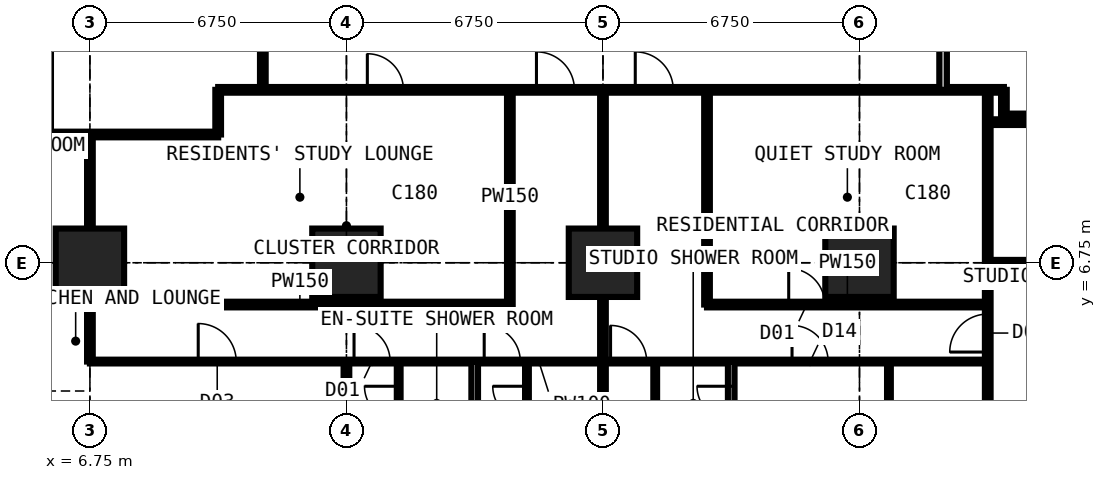
"""IFC4 building model, lengths in metres.
Left out: names, types, materials, properties, quantities, classifications, styles, units other than length and angle.
Written with IfcOpenShell. Run it as: python <this file> out.ifc"""

import sys

from ifc_helpers import new_model, si_unit, direction, frame, frame_2d, origin, origin_2d, place, context, subcontext, project, spatial, rectangle, extrude, element, fill, save


model = new_model("IFC4")
c1 = context("Model", 3, precision=1e-05, world=origin(), true_north=direction((0.0, 1.0)))
c2 = subcontext(c1, "Body", "Model", "MODEL_VIEW")
j1 = project(units=[si_unit("LENGTHUNIT", "METRE"), si_unit("PLANEANGLEUNIT", "RADIAN")], contexts=[c1])
p1 = place(None, origin())
s1 = spatial("IfcSite", under=j1, at=p1, CompositionType="ELEMENT")
p2 = place(p1, origin())
s2 = spatial("IfcBuilding", under=s1, at=p2, CompositionType="ELEMENT")
p3 = place(p2, frame((0.0, 0.0, 101.7)))
s3 = spatial("IfcBuildingStorey", under=s2, at=p3, CompositionType="ELEMENT", Elevation=101.7)
for number, where, z_axis, x_axis in (
    (1, (6.75, 6.75, 0.0), (0.0, 0.0, 1.0), (1.0, 0.0, 0.0)),
    (2, (13.5, 6.75, 0.0), (0.0, 0.0, 1.0), (1.0, 0.0, 0.0)),
    (3, (20.25, 6.75, 0.0), (0.0, 0.0, 1.0), (1.0, 0.0, 0.0)),
    (4, (27.0, 6.75, 0.0), (0.0, 0.0, 1.0), (1.0, 0.0, 0.0)),
):
    element("IfcColumn", number, at=place(p3, frame(where, z_axis=z_axis, x_axis=x_axis)), inside=s3, PredefinedType="COLUMN", context=c2, shape_type="SweptSolid", body=[
        extrude(rectangle(XDim=1.8, YDim=1.8, at=origin_2d()), origin(), (0.0, 0.0, 1.0), 3.6),
    ])
p4 = place(p3, frame((-0.734, 10.125, 0.0), z_axis=(0.0, 0.0, 1.0), x_axis=(1.0, 0.0, 0.0)))
e5 = element("IfcWall", 5, at=p4, inside=s3, PredefinedType="PARTITIONING", context=c2, shape_type="SweptSolid", body=[
    extrude(rectangle(XDim=10.859, YDim=0.15, at=frame_2d((5.429, 0.0))), origin(), (0.0, 0.0, 1.0), 3.375),
])
p5 = place(p3, frame((6.75, 4.15, 0.0), z_axis=(0.0, 0.0, 1.0), x_axis=(0.0, 1.0, 0.0)))
e6 = element("IfcWall", 6, at=p5, inside=s3, PredefinedType="PARTITIONING", context=c2, shape_type="SweptSolid", body=[
    extrude(rectangle(XDim=5.975, YDim=0.15, at=frame_2d((2.988, 0.0))), origin(), (0.0, 0.0, 1.0), 2.877),
])
p6 = place(p3, frame((6.75, 4.15, 0.0), z_axis=(0.0, 0.0, 1.0), x_axis=(1.0, 0.0, 0.0)))
e7 = element("IfcWall", 7, at=p6, inside=s3, PredefinedType="PARTITIONING", context=c2, shape_type="SweptSolid", body=[
    extrude(rectangle(XDim=23.625, YDim=0.1, at=frame_2d((11.812, 0.0))), origin(), (0.0, 0.0, 1.0), 3.375),
])
p7 = place(p6, frame((2.85, 0.0, 0.0)))
e8 = element("IfcOpeningElement", 8, at=p7, cuts=e7, PredefinedType="OPENING", context=c2, shape_type="SweptSolid", body=[
    extrude(rectangle(XDim=1.0, YDim=2.2, at=frame_2d((0.5, 1.1))), frame((0.0, 0.06, 0.0), z_axis=(0.0, -1.0, 0.0), x_axis=(1.0, 0.0, 0.0)), (0.0, 0.0, 1.0), 0.12),
])
p8 = place(p6, frame((6.95, 0.0, 0.0)))
e9 = element("IfcOpeningElement", 9, at=p8, cuts=e7, PredefinedType="OPENING", context=c2, shape_type="SweptSolid", body=[
    extrude(rectangle(XDim=0.95, YDim=2.2, at=frame_2d((0.475, 1.1))), frame((0.0, 0.06, 0.0), z_axis=(0.0, -1.0, 0.0), x_axis=(1.0, 0.0, 0.0)), (0.0, 0.0, 1.0), 0.12),
])
p9 = place(p6, frame((10.375, 0.0, 0.0)))
e10 = element("IfcOpeningElement", 10, at=p9, cuts=e7, PredefinedType="OPENING", context=c2, shape_type="SweptSolid", body=[
    extrude(rectangle(XDim=0.95, YDim=2.2, at=frame_2d((0.475, 1.1))), frame((0.0, 0.06, 0.0), z_axis=(0.0, -1.0, 0.0), x_axis=(1.0, 0.0, 0.0)), (0.0, 0.0, 1.0), 0.12),
])
p10 = place(p6, frame((18.475, 0.0, 0.0)))
e11 = element("IfcOpeningElement", 11, at=p10, cuts=e7, PredefinedType="OPENING", context=c2, shape_type="SweptSolid", body=[
    extrude(rectangle(XDim=0.95, YDim=2.2, at=frame_2d((0.475, 1.1))), frame((0.0, 0.06, 0.0), z_axis=(0.0, -1.0, 0.0), x_axis=(1.0, 0.0, 0.0)), (0.0, 0.0, 1.0), 0.12),
])
p11 = place(p6, frame((13.7, 0.0, 0.0)))
e12 = element("IfcOpeningElement", 12, at=p11, cuts=e7, PredefinedType="OPENING", context=c2, shape_type="SweptSolid", body=[
    extrude(rectangle(XDim=0.95, YDim=2.2, at=frame_2d((0.475, 1.1))), frame((0.0, 0.06, 0.0), z_axis=(0.0, -1.0, 0.0), x_axis=(1.0, 0.0, 0.0)), (0.0, 0.0, 1.0), 0.12),
])
p12 = place(p3, frame((6.75, 5.65, 0.0), z_axis=(0.0, 0.0, 1.0), x_axis=(1.0, 0.0, 0.0)))
e13 = element("IfcWall", 13, at=p12, inside=s3, PredefinedType="PARTITIONING", context=c2, shape_type="SweptSolid", body=[
    extrude(rectangle(XDim=11.05, YDim=0.15, at=frame_2d((5.525, 0.0))), origin(), (0.0, 0.0, 1.0), 3.375),
])
p13 = place(p3, frame((10.125, 10.125, 0.0), z_axis=(0.0, 0.0, 1.0), x_axis=(0.0, 1.0, 0.0)))
e14 = element("IfcWall", 14, at=p13, inside=s3, PredefinedType="PARTITIONING", context=c2, shape_type="SweptSolid", body=[
    extrude(rectangle(XDim=1.175, YDim=0.15, at=frame_2d((0.587, 0.0))), origin(), (0.0, 0.0, 1.0), 3.375),
])
p14 = place(p3, frame((10.125, 11.3, 0.0), z_axis=(0.0, 0.0, 1.0), x_axis=(1.0, 0.0, 0.0)))
e15 = element("IfcWall", 15, at=p14, inside=s3, PredefinedType="PARTITIONING", context=c2, shape_type="SweptSolid", body=[
    extrude(rectangle(XDim=20.675, YDim=0.15, at=frame_2d((10.337, 0.0))), origin(), (0.0, 0.0, 1.0), 3.375),
])
p15 = place(p14, frame((8.375, 0.0, 0.0)))
e16 = element("IfcOpeningElement", 16, at=p15, cuts=e15, PredefinedType="OPENING", context=c2, shape_type="SweptSolid", body=[
    extrude(rectangle(XDim=1.0, YDim=2.2, at=frame_2d((0.5, 1.1))), frame((0.0, 0.085, 0.0), z_axis=(0.0, -1.0, 0.0), x_axis=(1.0, 0.0, 0.0)), (0.0, 0.0, 1.0), 0.17),
])
p16 = place(p14, frame((10.975, 0.0, 0.0)))
e17 = element("IfcOpeningElement", 17, at=p16, cuts=e15, PredefinedType="OPENING", context=c2, shape_type="SweptSolid", body=[
    extrude(rectangle(XDim=1.0, YDim=2.2, at=frame_2d((0.5, 1.1))), frame((0.0, 0.085, 0.0), z_axis=(0.0, -1.0, 0.0), x_axis=(1.0, 0.0, 0.0)), (0.0, 0.0, 1.0), 0.17),
])
p17 = place(p14, frame((3.925, 0.0, 0.0)))
e18 = element("IfcOpeningElement", 18, at=p17, cuts=e15, PredefinedType="OPENING", context=c2, shape_type="SweptSolid", body=[
    extrude(rectangle(XDim=0.95, YDim=2.2, at=frame_2d((0.475, 1.1))), frame((0.0, 0.085, 0.0), z_axis=(0.0, -1.0, 0.0), x_axis=(1.0, 0.0, 0.0)), (0.0, 0.0, 1.0), 0.17),
])
p18 = place(p3, frame((11.3, 11.3, 0.0), z_axis=(0.0, 0.0, 1.0), x_axis=(0.0, 1.0, 0.0)))
e19 = element("IfcWall", 19, at=p18, inside=s3, PredefinedType="PARTITIONING", context=c2, shape_type="SweptSolid", body=[
    extrude(rectangle(XDim=19.3, YDim=0.15, at=frame_2d((9.65, 0.0))), origin(), (0.0, 0.0, 1.0), 3.375),
])
p19 = place(p18, frame((13.525, 0.0, 0.0)))
e20 = element("IfcOpeningElement", 20, at=p19, cuts=e19, PredefinedType="OPENING", context=c2, shape_type="SweptSolid", body=[
    extrude(rectangle(XDim=1.0, YDim=2.2, at=frame_2d((0.5, 1.1))), frame((0.0, 0.085, 0.0), z_axis=(0.0, -1.0, 0.0), x_axis=(1.0, 0.0, 0.0)), (0.0, 0.0, 1.0), 0.17),
])
p20 = place(p18, frame((10.438, 0.0, 0.0)))
e21 = element("IfcOpeningElement", 21, at=p20, cuts=e19, PredefinedType="OPENING", context=c2, shape_type="SweptSolid", body=[
    extrude(rectangle(XDim=1.0, YDim=2.2, at=frame_2d((0.5, 1.1))), frame((0.0, 0.085, 0.0), z_axis=(0.0, -1.0, 0.0), x_axis=(1.0, 0.0, 0.0)), (0.0, 0.0, 1.0), 0.17),
])
p21 = place(p3, frame((13.5, -0.734, 0.0), z_axis=(0.0, 0.0, 1.0), x_axis=(0.0, 1.0, 0.0)))
e22 = element("IfcWall", 22, at=p21, inside=s3, PredefinedType="PARTITIONING", context=c2, shape_type="SweptSolid", body=[
    extrude(rectangle(XDim=4.884, YDim=0.15, at=frame_2d((2.442, 0.0))), origin(), (0.0, 0.0, 1.0), 2.877),
])
p22 = place(p3, frame((14.875, 1.95, 0.0), z_axis=(0.0, 0.0, 1.0), x_axis=(0.0, 1.0, 0.0)))
e23 = element("IfcWall", 23, at=p22, inside=s3, PredefinedType="PARTITIONING", context=c2, shape_type="SweptSolid", body=[
    extrude(rectangle(XDim=2.2, YDim=0.1, at=frame_2d((1.1, 0.0))), origin(), (0.0, 0.0, 1.0), 3.375),
])
p23 = place(p22, frame((0.65, 0.0, 0.0)))
e24 = element("IfcOpeningElement", 24, at=p23, cuts=e23, PredefinedType="OPENING", context=c2, shape_type="SweptSolid", body=[
    extrude(rectangle(XDim=0.9, YDim=2.2, at=frame_2d((0.45, 1.1))), frame((0.0, 0.06, 0.0), z_axis=(0.0, -1.0, 0.0), x_axis=(1.0, 0.0, 0.0)), (0.0, 0.0, 1.0), 0.12),
])
p24 = place(p3, frame((16.875, -0.734, 0.0), z_axis=(0.0, 0.0, 1.0), x_axis=(0.0, 1.0, 0.0)))
e25 = element("IfcWall", 25, at=p24, inside=s3, PredefinedType="PARTITIONING", context=c2, shape_type="SweptSolid", body=[
    extrude(rectangle(XDim=4.884, YDim=0.175, at=frame_2d((2.442, 0.0))), origin(), (0.0, 0.0, 1.0), 3.375),
])
p25 = place(p3, frame((17.8, 5.65, 0.0), z_axis=(0.0, 0.0, 1.0), x_axis=(0.0, 1.0, 0.0)))
e26 = element("IfcWall", 26, at=p25, inside=s3, PredefinedType="PARTITIONING", context=c2, shape_type="SweptSolid", body=[
    extrude(rectangle(XDim=5.65, YDim=0.15, at=frame_2d((2.825, 0.0))), origin(), (0.0, 0.0, 1.0), 3.375),
])
p26 = place(p3, frame((18.25, 1.95, 0.0), z_axis=(0.0, 0.0, 1.0), x_axis=(0.0, 1.0, 0.0)))
e27 = element("IfcWall", 27, at=p26, inside=s3, PredefinedType="PARTITIONING", context=c2, shape_type="SweptSolid", body=[
    extrude(rectangle(XDim=2.2, YDim=0.1, at=frame_2d((1.1, 0.0))), origin(), (0.0, 0.0, 1.0), 3.375),
])
p27 = place(p26, frame((0.65, 0.0, 0.0)))
e28 = element("IfcOpeningElement", 28, at=p27, cuts=e27, PredefinedType="OPENING", context=c2, shape_type="SweptSolid", body=[
    extrude(rectangle(XDim=0.9, YDim=2.2, at=frame_2d((0.45, 1.1))), frame((0.0, 0.06, 0.0), z_axis=(0.0, -1.0, 0.0), x_axis=(1.0, 0.0, 0.0)), (0.0, 0.0, 1.0), 0.12),
])
p28 = place(p3, frame((20.25, -0.734, 0.0), z_axis=(0.0, 0.0, 1.0), x_axis=(0.0, 1.0, 0.0)))
e29 = element("IfcWall", 29, at=p28, inside=s3, PredefinedType="PARTITIONING", context=c2, shape_type="SweptSolid", body=[
    extrude(rectangle(XDim=12.034, YDim=0.15, at=frame_2d((6.017, 0.0))), origin(), (0.0, 0.0, 1.0), 2.61),
])
p29 = place(p3, frame((21.625, 1.95, 0.0), z_axis=(0.0, 0.0, 1.0), x_axis=(0.0, 1.0, 0.0)))
e30 = element("IfcWall", 30, at=p29, inside=s3, PredefinedType="PARTITIONING", context=c2, shape_type="SweptSolid", body=[
    extrude(rectangle(XDim=2.2, YDim=0.1, at=frame_2d((1.1, 0.0))), origin(), (0.0, 0.0, 1.0), 3.375),
])
p30 = place(p3, frame((22.988, 5.65, 0.0), z_axis=(0.0, 0.0, 1.0), x_axis=(1.0, 0.0, 0.0)))
e31 = element("IfcWall", 31, at=p30, inside=s3, PredefinedType="PARTITIONING", context=c2, shape_type="SweptSolid", body=[
    extrude(rectangle(XDim=7.387, YDim=0.15, at=frame_2d((3.694, 0.0))), origin(), (0.0, 0.0, 1.0), 3.375),
])
p31 = place(p30, frame((2.15, 0.0, 0.0)))
e32 = element("IfcOpeningElement", 32, at=p31, cuts=e31, PredefinedType="OPENING", context=c2, shape_type="SweptSolid", body=[
    extrude(rectangle(XDim=0.95, YDim=2.2, at=frame_2d((0.475, 1.1))), frame((0.0, 0.085, 0.0), z_axis=(0.0, -1.0, 0.0), x_axis=(1.0, 0.0, 0.0)), (0.0, 0.0, 1.0), 0.17),
])
p32 = place(p3, frame((22.988, 5.65, 0.0), z_axis=(0.0, 0.0, 1.0), x_axis=(0.0, 1.0, 0.0)))
e33 = element("IfcWall", 33, at=p32, inside=s3, PredefinedType="PARTITIONING", context=c2, shape_type="SweptSolid", body=[
    extrude(rectangle(XDim=5.65, YDim=0.15, at=frame_2d((2.825, 0.0))), origin(), (0.0, 0.0, 1.0), 3.375),
])
p33 = place(p3, frame((23.625, -0.734, 0.0), z_axis=(0.0, 0.0, 1.0), x_axis=(0.0, 1.0, 0.0)))
e34 = element("IfcWall", 34, at=p33, inside=s3, PredefinedType="PARTITIONING", context=c2, shape_type="SweptSolid", body=[
    extrude(rectangle(XDim=4.884, YDim=0.175, at=frame_2d((2.442, 0.0))), origin(), (0.0, 0.0, 1.0), 3.375),
])
p34 = place(p33, frame((3.334, 0.0, 0.0)))
e35 = element("IfcOpeningElement", 35, at=p34, cuts=e34, PredefinedType="OPENING", context=c2, shape_type="SweptSolid", body=[
    extrude(rectangle(XDim=0.9, YDim=2.2, at=frame_2d((0.45, 1.1))), frame((0.0, 0.097, 0.0), z_axis=(0.0, -1.0, 0.0), x_axis=(1.0, 0.0, 0.0)), (0.0, 0.0, 1.0), 0.195),
])
p35 = place(p3, frame((27.775, 1.75, 0.0), z_axis=(0.0, 0.0, 1.0), x_axis=(0.0, 1.0, 0.0)))
e36 = element("IfcWall", 36, at=p35, inside=s3, PredefinedType="PARTITIONING", context=c2, shape_type="SweptSolid", body=[
    extrude(rectangle(XDim=2.4, YDim=0.1, at=frame_2d((1.2, 0.0))), origin(), (0.0, 0.0, 1.0), 3.375),
])
p36 = place(p3, frame((29.2, 11.3, 0.0), z_axis=(0.0, 0.0, 1.0), x_axis=(0.0, 1.0, 0.0)))
e37 = element("IfcWall", 37, at=p36, inside=s3, PredefinedType="PARTITIONING", context=c2, shape_type="SweptSolid", body=[
    extrude(rectangle(XDim=17.9, YDim=0.2, at=frame_2d((8.95, 0.0))), origin(), (0.0, 0.0, 1.0), 3.375),
])
p37 = place(p36, frame((8.35, 0.0, 0.0)))
e38 = element("IfcOpeningElement", 38, at=p37, cuts=e37, PredefinedType="OPENING", context=c2, shape_type="SweptSolid", body=[
    extrude(rectangle(XDim=1.2, YDim=2.2, at=frame_2d((0.6, 1.1))), frame((0.0, 0.11, 0.0), z_axis=(0.0, -1.0, 0.0), x_axis=(1.0, 0.0, 0.0)), (0.0, 0.0, 1.0), 0.22),
])
p38 = place(p3, frame((30.375, -0.734, 0.0), z_axis=(0.0, 0.0, 1.0), x_axis=(0.0, 1.0, 0.0)))
e39 = element("IfcWall", 39, at=p38, inside=s3, PredefinedType="PARTITIONING", context=c2, shape_type="SweptSolid", body=[
    extrude(rectangle(XDim=12.034, YDim=0.15, at=frame_2d((6.017, 0.0))), origin(), (0.0, 0.0, 1.0), 3.375),
])
p39 = place(p38, frame((5.134, 0.0, 0.0)))
e40 = element("IfcOpeningElement", 40, at=p39, cuts=e39, PredefinedType="OPENING", context=c2, shape_type="SweptSolid", body=[
    extrude(rectangle(XDim=1.0, YDim=2.2, at=frame_2d((0.5, 1.1))), frame((0.0, 0.085, 0.0), z_axis=(0.0, -1.0, 0.0), x_axis=(1.0, 0.0, 0.0)), (0.0, 0.0, 1.0), 0.17),
])
p40 = place(p3, frame((30.375, 6.75, 0.0), z_axis=(0.0, 0.0, 1.0), x_axis=(1.0, 0.0, 0.0)))
e41 = element("IfcWall", 41, at=p40, inside=s3, PredefinedType="PARTITIONING", context=c2, shape_type="SweptSolid", body=[
    extrude(rectangle(XDim=5.975, YDim=0.15, at=frame_2d((2.988, 0.0))), origin(), (0.0, 0.0, 1.0), 2.877),
])
p41 = place(p3, frame((30.375, 10.45, 0.0), z_axis=(0.0, 0.0, 1.0), x_axis=(1.0, 0.0, 0.0)))
e42 = element("IfcWall", 42, at=p41, inside=s3, PredefinedType="PARTITIONING", context=c2, shape_type="SweptSolid", body=[
    extrude(rectangle(XDim=4.475, YDim=0.15, at=frame_2d((2.238, 0.0))), origin(), (0.0, 0.0, 1.0), 3.375),
])
p42 = place(p41, frame((2.35, 0.0, 0.0)))
e43 = element("IfcOpeningElement", 43, at=p42, cuts=e42, PredefinedType="OPENING", context=c2, shape_type="SweptSolid", body=[
    extrude(rectangle(XDim=0.95, YDim=2.2, at=frame_2d((0.475, 1.1))), frame((0.0, 0.085, 0.0), z_axis=(0.0, -1.0, 0.0), x_axis=(1.0, 0.0, 0.0)), (0.0, 0.0, 1.0), 0.17),
])
p43 = place(p3, frame((30.8, 10.6, 0.0), z_axis=(0.0, 0.0, 1.0), x_axis=(0.0, 1.0, 0.0)))
e44 = element("IfcWall", 44, at=p43, inside=s3, PredefinedType="PARTITIONING", context=c2, shape_type="SweptSolid", body=[
    extrude(rectangle(XDim=0.7, YDim=0.15, at=frame_2d((0.35, 0.0))), origin(), (0.0, 0.0, 1.0), 3.375),
])
p44 = place(p3, frame((30.8, 10.6, 0.0), z_axis=(0.0, 0.0, 1.0), x_axis=(1.0, 0.0, 0.0)))
e45 = element("IfcWall", 45, at=p44, inside=s3, PredefinedType="PARTITIONING", context=c2, shape_type="SweptSolid", body=[
    extrude(rectangle(XDim=1.85, YDim=0.15, at=frame_2d((0.925, 0.0))), origin(), (0.0, 0.0, 1.0), 3.375),
])
p45 = place(p7, origin())
e46 = element("IfcDoor", 46, at=p45, inside=s3, OperationType="SINGLE_SWING_LEFT", PredefinedType="DOOR", context=c2, shape_type="SweptSolid", body=[
    extrude(rectangle(XDim=1.0, YDim=2.2, at=frame_2d((0.5, 1.1))), frame((0.0, 0.025, 0.0), z_axis=(0.0, -1.0, 0.0), x_axis=(1.0, 0.0, 0.0)), (0.0, 0.0, 1.0), 0.05),
])
fill(e8, e46)
p46 = place(p8, origin())
e47 = element("IfcDoor", 47, at=p46, inside=s3, OperationType="SINGLE_SWING_LEFT", PredefinedType="DOOR", context=c2, shape_type="SweptSolid", body=[
    extrude(rectangle(XDim=0.95, YDim=2.2, at=frame_2d((0.475, 1.1))), frame((0.0, 0.025, 0.0), z_axis=(0.0, -1.0, 0.0), x_axis=(1.0, 0.0, 0.0)), (0.0, 0.0, 1.0), 0.05),
])
fill(e9, e47)
p47 = place(p23, origin())
e48 = element("IfcDoor", 48, at=p47, inside=s3, OperationType="SINGLE_SWING_RIGHT", PredefinedType="DOOR", context=c2, shape_type="SweptSolid", body=[
    extrude(rectangle(XDim=0.9, YDim=2.2, at=frame_2d((0.45, 1.1))), frame((0.0, 0.025, 0.0), z_axis=(0.0, -1.0, 0.0), x_axis=(1.0, 0.0, 0.0)), (0.0, 0.0, 1.0), 0.05),
])
fill(e24, e48)
p48 = place(p9, origin())
e49 = element("IfcDoor", 49, at=p48, inside=s3, OperationType="SINGLE_SWING_LEFT", PredefinedType="DOOR", context=c2, shape_type="SweptSolid", body=[
    extrude(rectangle(XDim=0.95, YDim=2.2, at=frame_2d((0.475, 1.1))), frame((0.0, 0.025, 0.0), z_axis=(0.0, -1.0, 0.0), x_axis=(1.0, 0.0, 0.0)), (0.0, 0.0, 1.0), 0.05),
])
fill(e10, e49)
p49 = place(p27, origin())
e50 = element("IfcDoor", 50, at=p49, inside=s3, OperationType="SINGLE_SWING_RIGHT", PredefinedType="DOOR", context=c2, shape_type="SweptSolid", body=[
    extrude(rectangle(XDim=0.9, YDim=2.2, at=frame_2d((0.45, 1.1))), frame((0.0, 0.025, 0.0), z_axis=(0.0, -1.0, 0.0), x_axis=(1.0, 0.0, 0.0)), (0.0, 0.0, 1.0), 0.05),
])
fill(e28, e50)
p50 = place(p15, origin())
e51 = element("IfcDoor", 51, at=p50, inside=s3, OperationType="SINGLE_SWING_LEFT", PredefinedType="DOOR", context=c2, shape_type="SweptSolid", body=[
    extrude(rectangle(XDim=1.0, YDim=2.2, at=frame_2d((0.5, 1.1))), frame((0.0, 0.025, 0.0), z_axis=(0.0, -1.0, 0.0), x_axis=(1.0, 0.0, 0.0)), (0.0, 0.0, 1.0), 0.05),
])
fill(e16, e51)
p51 = place(p10, origin())
e52 = element("IfcDoor", 52, at=p51, inside=s3, OperationType="SINGLE_SWING_LEFT", PredefinedType="DOOR", context=c2, shape_type="SweptSolid", body=[
    extrude(rectangle(XDim=0.95, YDim=2.2, at=frame_2d((0.475, 1.1))), frame((0.0, 0.025, 0.0), z_axis=(0.0, -1.0, 0.0), x_axis=(1.0, 0.0, 0.0)), (0.0, 0.0, 1.0), 0.05),
])
fill(e11, e52)
p52 = place(p11, origin())
e53 = element("IfcDoor", 53, at=p52, inside=s3, OperationType="SINGLE_SWING_LEFT", PredefinedType="DOOR", context=c2, shape_type="SweptSolid", body=[
    extrude(rectangle(XDim=0.95, YDim=2.2, at=frame_2d((0.475, 1.1))), frame((0.0, 0.025, 0.0), z_axis=(0.0, -1.0, 0.0), x_axis=(1.0, 0.0, 0.0)), (0.0, 0.0, 1.0), 0.05),
])
fill(e12, e53)
p53 = place(p34, origin())
e54 = element("IfcDoor", 54, at=p53, inside=s3, OperationType="SINGLE_SWING_RIGHT", PredefinedType="DOOR", context=c2, shape_type="SweptSolid", body=[
    extrude(rectangle(XDim=0.9, YDim=2.2, at=frame_2d((0.45, 1.1))), frame((0.0, 0.025, 0.0), z_axis=(0.0, -1.0, 0.0), x_axis=(1.0, 0.0, 0.0)), (0.0, 0.0, 1.0), 0.05),
])
fill(e35, e54)
p54 = place(p16, origin())
e55 = element("IfcDoor", 55, at=p54, inside=s3, OperationType="SINGLE_SWING_LEFT", PredefinedType="DOOR", context=c2, shape_type="SweptSolid", body=[
    extrude(rectangle(XDim=1.0, YDim=2.2, at=frame_2d((0.5, 1.1))), frame((0.0, 0.025, 0.0), z_axis=(0.0, -1.0, 0.0), x_axis=(1.0, 0.0, 0.0)), (0.0, 0.0, 1.0), 0.05),
])
fill(e17, e55)
p55 = place(p17, origin())
e56 = element("IfcDoor", 56, at=p55, inside=s3, OperationType="SINGLE_SWING_LEFT", PredefinedType="DOOR", context=c2, shape_type="SweptSolid", body=[
    extrude(rectangle(XDim=0.95, YDim=2.2, at=frame_2d((0.475, 1.1))), frame((0.0, 0.025, 0.0), z_axis=(0.0, -1.0, 0.0), x_axis=(1.0, 0.0, 0.0)), (0.0, 0.0, 1.0), 0.05),
])
fill(e18, e56)
p56 = place(p31, origin())
e57 = element("IfcDoor", 57, at=p56, inside=s3, OperationType="SINGLE_SWING_LEFT", PredefinedType="DOOR", context=c2, shape_type="SweptSolid", body=[
    extrude(rectangle(XDim=0.95, YDim=2.2, at=frame_2d((0.475, 1.1))), frame((0.0, 0.025, 0.0), z_axis=(0.0, -1.0, 0.0), x_axis=(1.0, 0.0, 0.0)), (0.0, 0.0, 1.0), 0.05),
])
fill(e32, e57)
p57 = place(p39, origin())
e58 = element("IfcDoor", 58, at=p57, inside=s3, OperationType="SINGLE_SWING_LEFT", PredefinedType="DOOR", context=c2, shape_type="SweptSolid", body=[
    extrude(rectangle(XDim=1.0, YDim=2.2, at=frame_2d((0.5, 1.1))), frame((0.0, 0.025, 0.0), z_axis=(0.0, -1.0, 0.0), x_axis=(1.0, 0.0, 0.0)), (0.0, 0.0, 1.0), 0.05),
])
fill(e40, e58)
save(model, sys.argv[1])
